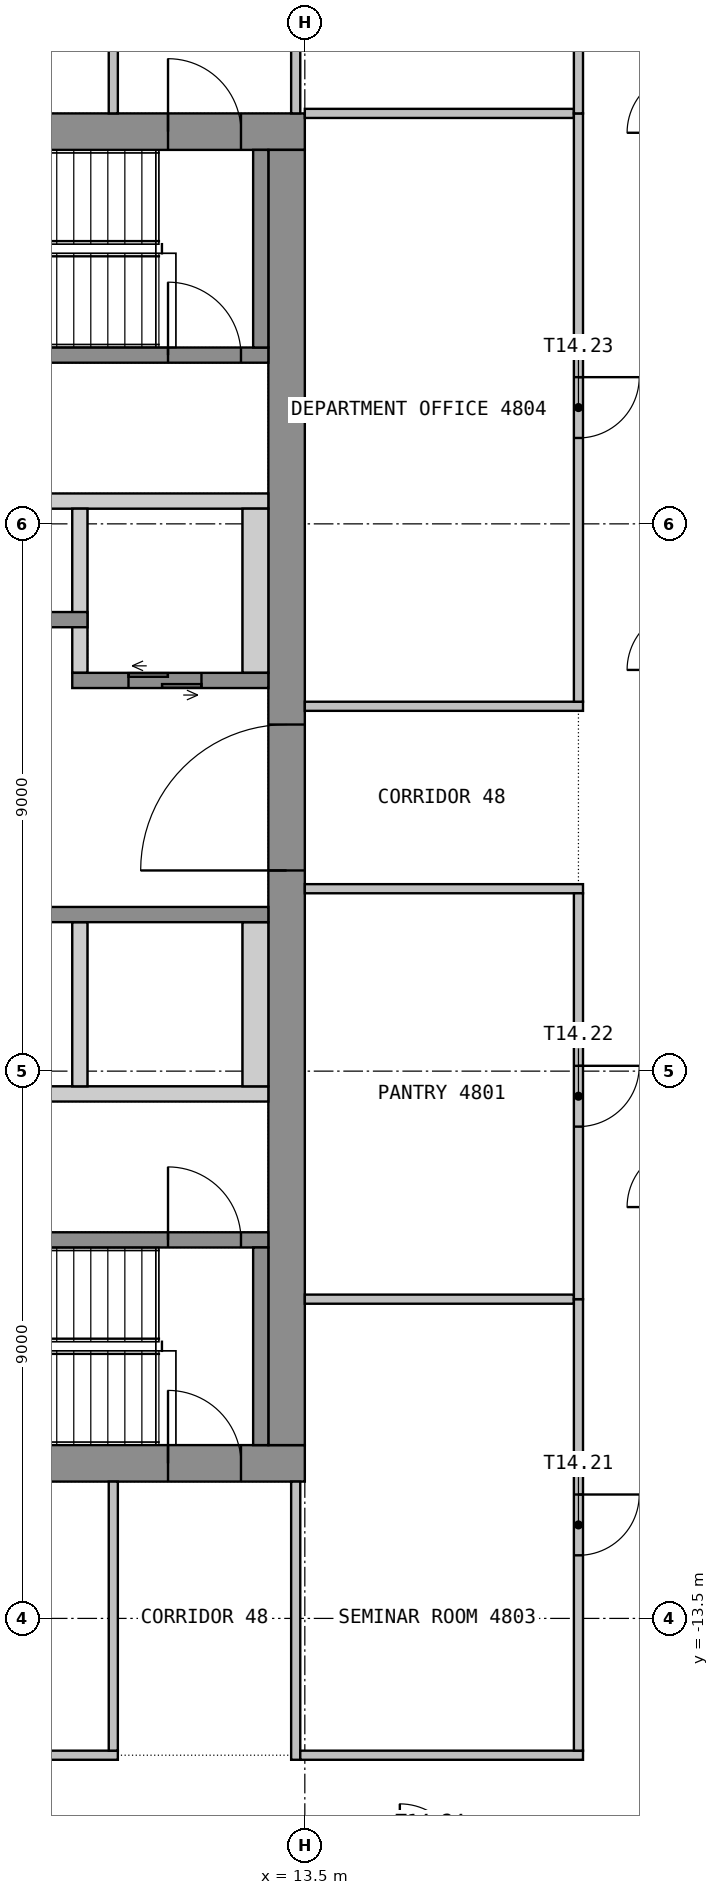
"""IFC4 building model, lengths in metres.
Left out: names, types, materials, properties, quantities, classifications, styles, units other than length and angle.
Written with IfcOpenShell. Run it as: python <this file> out.ifc"""

import sys

from ifc_helpers import new_model, si_unit, direction, frame, frame_2d, origin, place, context, subcontext, project, spatial, polyline, rectangle, outline, extrude, element, fill, save


model = new_model("IFC4")
c1 = context("Model", 3, precision=1e-05, world=origin(), true_north=direction((0.0, 1.0)))
c2 = subcontext(c1, "Body", "Model", "MODEL_VIEW")
j1 = project(units=[si_unit("LENGTHUNIT", "METRE"), si_unit("PLANEANGLEUNIT", "RADIAN")], contexts=[c1])
p1 = place(None, origin())
s1 = spatial("IfcSite", under=j1, at=p1, CompositionType="ELEMENT")
p2 = place(p1, origin())
s2 = spatial("IfcBuilding", under=s1, at=p2, CompositionType="ELEMENT")
p3 = place(p2, frame((0.0, 0.0, 195.6)))
s3 = spatial("IfcBuildingStorey", under=s2, at=p3, CompositionType="ELEMENT", Elevation=195.6)
p4 = place(p3, frame((-13.5, 10.95, 0.0), z_axis=(0.0, 0.0, 1.0), x_axis=(1.0, 0.0, 0.0)))
e1 = element("IfcWall", 1, at=p4, inside=s3, PredefinedType="SHEAR", context=c2, shape_type="SweptSolid", body=[
    extrude(rectangle(XDim=27.0, YDim=0.6, at=frame_2d((13.5, 0.0))), origin(), (0.0, 0.0, 1.0), 3.55),
])
p5 = place(p4, frame((12.3, 0.0, 0.0)))
e2 = element("IfcOpeningElement", 2, at=p5, cuts=e1, PredefinedType="OPENING", context=c2, shape_type="SweptSolid", body=[
    extrude(rectangle(XDim=2.4, YDim=2.1, at=frame_2d((1.2, 1.05))), frame((0.0, 0.31, 0.0), z_axis=(0.0, -1.0, 0.0), x_axis=(1.0, 0.0, 0.0)), (0.0, 0.0, 1.0), 0.62),
])
p6 = place(p4, frame((1.05, 0.0, 0.0)))
e3 = element("IfcOpeningElement", 3, at=p6, cuts=e1, PredefinedType="OPENING", context=c2, shape_type="SweptSolid", body=[
    extrude(rectangle(XDim=1.2, YDim=2.1, at=frame_2d((0.6, 1.05))), frame((0.0, 0.31, 0.0), z_axis=(0.0, -1.0, 0.0), x_axis=(1.0, 0.0, 0.0)), (0.0, 0.0, 1.0), 0.62),
])
p7 = place(p4, frame((24.75, 0.0, 0.0)))
e4 = element("IfcOpeningElement", 4, at=p7, cuts=e1, PredefinedType="OPENING", context=c2, shape_type="SweptSolid", body=[
    extrude(rectangle(XDim=1.2, YDim=2.1, at=frame_2d((0.6, 1.05))), frame((0.0, 0.31, 0.0), z_axis=(0.0, -1.0, 0.0), x_axis=(1.0, 0.0, 0.0)), (0.0, 0.0, 1.0), 0.62),
])
p8 = place(p3, frame((-13.5, -10.95, 0.0), z_axis=(0.0, 0.0, 1.0), x_axis=(1.0, 0.0, 0.0)))
e5 = element("IfcWall", 5, at=p8, inside=s3, PredefinedType="SHEAR", context=c2, shape_type="SweptSolid", body=[
    extrude(rectangle(XDim=27.0, YDim=0.6, at=frame_2d((13.5, 0.0))), origin(), (0.0, 0.0, 1.0), 3.55),
])
p9 = place(p8, frame((12.3, 0.0, 0.0)))
e6 = element("IfcOpeningElement", 6, at=p9, cuts=e5, PredefinedType="OPENING", context=c2, shape_type="SweptSolid", body=[
    extrude(rectangle(XDim=2.4, YDim=2.1, at=frame_2d((1.2, 1.05))), frame((0.0, 0.31, 0.0), z_axis=(0.0, -1.0, 0.0), x_axis=(1.0, 0.0, 0.0)), (0.0, 0.0, 1.0), 0.62),
])
p10 = place(p8, frame((1.05, 0.0, 0.0)))
e7 = element("IfcOpeningElement", 7, at=p10, cuts=e5, PredefinedType="OPENING", context=c2, shape_type="SweptSolid", body=[
    extrude(rectangle(XDim=1.2, YDim=2.1, at=frame_2d((0.6, 1.05))), frame((0.0, 0.31, 0.0), z_axis=(0.0, -1.0, 0.0), x_axis=(1.0, 0.0, 0.0)), (0.0, 0.0, 1.0), 0.62),
])
p11 = place(p8, frame((24.75, 0.0, 0.0)))
e8 = element("IfcOpeningElement", 8, at=p11, cuts=e5, PredefinedType="OPENING", context=c2, shape_type="SweptSolid", body=[
    extrude(rectangle(XDim=1.2, YDim=2.1, at=frame_2d((0.6, 1.05))), frame((0.0, 0.31, 0.0), z_axis=(0.0, -1.0, 0.0), x_axis=(1.0, 0.0, 0.0)), (0.0, 0.0, 1.0), 0.62),
])
p12 = place(p3, frame((13.2, -10.65, 0.0), z_axis=(0.0, 0.0, 1.0), x_axis=(0.0, 1.0, 0.0)))
e9 = element("IfcWall", 9, at=p12, inside=s3, PredefinedType="SHEAR", context=c2, shape_type="SweptSolid", body=[
    extrude(rectangle(XDim=21.3, YDim=0.6, at=frame_2d((10.65, 0.0))), origin(), (0.0, 0.0, 1.0), 3.55),
])
p13 = place(p12, frame((9.45, 0.0, 0.0)))
e10 = element("IfcOpeningElement", 10, at=p13, cuts=e9, PredefinedType="OPENING", context=c2, shape_type="SweptSolid", body=[
    extrude(rectangle(XDim=2.4, YDim=2.1, at=frame_2d((1.2, 1.05))), frame((0.0, 0.31, 0.0), z_axis=(0.0, -1.0, 0.0), x_axis=(1.0, 0.0, 0.0)), (0.0, 0.0, 1.0), 0.62),
])
p14 = place(p3, origin())
e11 = element("IfcWall", 11, at=p14, inside=s3, PredefinedType="SHEAR", context=c2, shape_type="SweptSolid", body=[
    extrude(outline(polyline([(4.075, 4.75), (12.9, 4.75), (12.9, 5.0), (4.075, 5.0), (4.075, 4.75)])), origin(), (0.0, 0.0, 1.0), 3.55),
])
p15 = place(p3, origin())
e12 = element("IfcWall", 12, at=p15, inside=s3, PredefinedType="SHEAR", context=c2, shape_type="SweptSolid", body=[
    extrude(outline(polyline([(9.675, 2.05), (9.925, 2.05), (9.925, 4.75), (9.675, 4.75), (9.675, 2.05)])), origin(), (0.0, 0.0, 1.0), 3.55),
])
p16 = place(p3, origin())
e13 = element("IfcWall", 13, at=p16, inside=s3, PredefinedType="SHEAR", context=c2, shape_type="SweptSolid", body=[
    extrude(outline(polyline([(12.475, 2.05), (12.9, 2.05), (12.9, 4.75), (12.475, 4.75), (12.475, 2.05)])), origin(), (0.0, 0.0, 1.0), 3.55),
])
p17 = place(p3, frame((4.075, 2.925, 0.0), z_axis=(0.0, 0.0, 1.0), x_axis=(1.0, 0.0, 0.0)))
e14 = element("IfcWall", 14, at=p17, inside=s3, PredefinedType="SHEAR", context=c2, shape_type="SweptSolid", body=[
    extrude(rectangle(XDim=5.85, YDim=0.25, at=frame_2d((2.925, 0.0))), origin(), (0.0, 0.0, 1.0), 3.55),
])
p18 = place(p17, frame((0.925, 0.0, 0.0)))
e15 = element("IfcOpeningElement", 15, at=p18, cuts=e14, PredefinedType="OPENING", context=c2, shape_type="SweptSolid", body=[
    extrude(rectangle(XDim=1.2, YDim=2.1, at=frame_2d((0.6, 1.05))), frame((0.0, 0.135, 0.0), z_axis=(0.0, -1.0, 0.0), x_axis=(1.0, 0.0, 0.0)), (0.0, 0.0, 1.0), 0.27),
])
p19 = place(p17, frame((3.725, 0.0, 0.0)))
e16 = element("IfcOpeningElement", 16, at=p19, cuts=e14, PredefinedType="OPENING", context=c2, shape_type="SweptSolid", body=[
    extrude(rectangle(XDim=1.2, YDim=2.1, at=frame_2d((0.6, 1.05))), frame((0.0, 0.135, 0.0), z_axis=(0.0, -1.0, 0.0), x_axis=(1.0, 0.0, 0.0)), (0.0, 0.0, 1.0), 0.27),
])
p20 = place(p3, frame((9.675, 1.925, 0.0), z_axis=(0.0, 0.0, 1.0), x_axis=(1.0, 0.0, 0.0)))
e17 = element("IfcWall", 17, at=p20, inside=s3, PredefinedType="SHEAR", context=c2, shape_type="SweptSolid", body=[
    extrude(rectangle(XDim=3.225, YDim=0.25, at=frame_2d((1.612, 0.0))), origin(), (0.0, 0.0, 1.0), 3.55),
])
p21 = place(p20, frame((0.925, 0.0, 0.0)))
e18 = element("IfcOpeningElement", 18, at=p21, cuts=e17, PredefinedType="OPENING", context=c2, shape_type="SweptSolid", body=[
    extrude(rectangle(XDim=1.2, YDim=2.1, at=frame_2d((0.6, 1.05))), frame((0.0, 0.135, 0.0), z_axis=(0.0, -1.0, 0.0), x_axis=(1.0, 0.0, 0.0)), (0.0, 0.0, 1.0), 0.27),
])
p22 = place(p3, origin())
e19 = element("IfcWall", 19, at=p22, inside=s3, PredefinedType="SHEAR", context=c2, shape_type="SweptSolid", body=[
    extrude(outline(polyline([(-1.525, -5.0), (12.9, -5.0), (12.9, -4.75), (-1.525, -4.75), (-1.525, -5.0)])), origin(), (0.0, 0.0, 1.0), 3.55),
])
p23 = place(p3, origin())
e20 = element("IfcWall", 20, at=p23, inside=s3, PredefinedType="SHEAR", context=c2, shape_type="SweptSolid", body=[
    extrude(outline(polyline([(9.675, -4.75), (9.925, -4.75), (9.925, -2.05), (9.675, -2.05), (9.675, -4.75)])), origin(), (0.0, 0.0, 1.0), 3.55),
])
p24 = place(p3, origin())
e21 = element("IfcWall", 21, at=p24, inside=s3, PredefinedType="SHEAR", context=c2, shape_type="SweptSolid", body=[
    extrude(outline(polyline([(12.475, -4.75), (12.9, -4.75), (12.9, -2.05), (12.475, -2.05), (12.475, -4.75)])), origin(), (0.0, 0.0, 1.0), 3.55),
])
p25 = place(p3, frame((-1.525, -1.925, 0.0), z_axis=(0.0, 0.0, 1.0), x_axis=(1.0, 0.0, 0.0)))
e22 = element("IfcWall", 22, at=p25, inside=s3, PredefinedType="SHEAR", context=c2, shape_type="SweptSolid", body=[
    extrude(rectangle(XDim=14.425, YDim=0.25, at=frame_2d((7.212, 0.0))), origin(), (0.0, 0.0, 1.0), 3.55),
])
p26 = place(p25, frame((0.925, 0.0, 0.0)))
e23 = element("IfcOpeningElement", 23, at=p26, cuts=e22, PredefinedType="OPENING", context=c2, shape_type="SweptSolid", body=[
    extrude(rectangle(XDim=1.2, YDim=2.1, at=frame_2d((0.6, 1.05))), frame((0.0, 0.135, 0.0), z_axis=(0.0, -1.0, 0.0), x_axis=(1.0, 0.0, 0.0)), (0.0, 0.0, 1.0), 0.27),
])
p27 = place(p25, frame((3.725, 0.0, 0.0)))
e24 = element("IfcOpeningElement", 24, at=p27, cuts=e22, PredefinedType="OPENING", context=c2, shape_type="SweptSolid", body=[
    extrude(rectangle(XDim=1.2, YDim=2.1, at=frame_2d((0.6, 1.05))), frame((0.0, 0.135, 0.0), z_axis=(0.0, -1.0, 0.0), x_axis=(1.0, 0.0, 0.0)), (0.0, 0.0, 1.0), 0.27),
])
p28 = place(p3, frame((2.8, 7.275, 0.0), z_axis=(0.0, 0.0, 1.0), x_axis=(1.0, 0.0, 0.0)))
e25 = element("IfcWall", 25, at=p28, inside=s3, PredefinedType="SHEAR", context=c2, shape_type="SweptSolid", body=[
    extrude(rectangle(XDim=10.1, YDim=0.25, at=frame_2d((5.05, 0.0))), origin(), (0.0, 0.0, 1.0), 3.55),
])
p29 = place(p28, frame((8.45, 0.0, 0.0)))
e26 = element("IfcOpeningElement", 26, at=p29, cuts=e25, PredefinedType="OPENING", context=c2, shape_type="SweptSolid", body=[
    extrude(rectangle(XDim=1.2, YDim=2.1, at=frame_2d((0.6, 1.05))), frame((0.0, 0.135, 0.0), z_axis=(0.0, -1.0, 0.0), x_axis=(1.0, 0.0, 0.0)), (0.0, 0.0, 1.0), 0.27),
])
p30 = place(p3, frame((12.775, 7.4, 0.0), z_axis=(0.0, 0.0, 1.0), x_axis=(0.0, 1.0, 0.0)))
e27 = element("IfcWall", 27, at=p30, inside=s3, PredefinedType="SHEAR", context=c2, shape_type="SweptSolid", body=[
    extrude(rectangle(XDim=3.25, YDim=0.25, at=frame_2d((1.625, 0.0))), origin(), (0.0, 0.0, 1.0), 3.55),
])
p31 = place(p3, frame((2.8, -7.275, 0.0), z_axis=(0.0, 0.0, 1.0), x_axis=(1.0, 0.0, 0.0)))
e28 = element("IfcWall", 28, at=p31, inside=s3, PredefinedType="SHEAR", context=c2, shape_type="SweptSolid", body=[
    extrude(rectangle(XDim=10.1, YDim=0.25, at=frame_2d((5.05, 0.0))), origin(), (0.0, 0.0, 1.0), 3.55),
])
p32 = place(p31, frame((8.45, 0.0, 0.0)))
e29 = element("IfcOpeningElement", 29, at=p32, cuts=e28, PredefinedType="OPENING", context=c2, shape_type="SweptSolid", body=[
    extrude(rectangle(XDim=1.2, YDim=2.1, at=frame_2d((0.6, 1.05))), frame((0.0, 0.135, 0.0), z_axis=(0.0, -1.0, 0.0), x_axis=(1.0, 0.0, 0.0)), (0.0, 0.0, 1.0), 0.27),
])
p33 = place(p3, frame((12.775, -10.65, 0.0), z_axis=(0.0, 0.0, 1.0), x_axis=(0.0, 1.0, 0.0)))
e30 = element("IfcWall", 30, at=p33, inside=s3, PredefinedType="SHEAR", context=c2, shape_type="SweptSolid", body=[
    extrude(rectangle(XDim=3.25, YDim=0.25, at=frame_2d((1.625, 0.0))), origin(), (0.0, 0.0, 1.0), 3.55),
])
p34 = place(p3, frame((10.425, -15.75, 0.0), z_axis=(0.0, 0.0, 1.0), x_axis=(-1.0, 0.0, 0.0)))
e31 = element("IfcWall", 31, at=p34, inside=s3, PredefinedType="PARTITIONING", context=c2, shape_type="SweptSolid", body=[
    extrude(rectangle(XDim=8.85, YDim=0.15, at=frame_2d((4.425, 0.0))), origin(), (0.0, 0.0, 1.0), 3.55),
])
p35 = place(p34, frame((3.925, 0.0, 0.0)))
e32 = element("IfcOpeningElement", 32, at=p35, cuts=e31, PredefinedType="OPENING", context=c2, shape_type="SweptSolid", body=[
    extrude(rectangle(XDim=1.0, YDim=2.1, at=frame_2d((0.5, 1.05))), frame((0.0, 0.085, 0.0), z_axis=(0.0, -1.0, 0.0), x_axis=(1.0, 0.0, 0.0)), (0.0, 0.0, 1.0), 0.17),
])
for number, where, z_axis, x_axis in (
    (33, (10.35, -11.25, 0.0), (0.0, 0.0, 1.0), (0.0, -1.0, 0.0)),
    (34, (10.35, 15.675, 0.0), (0.0, 0.0, 1.0), (0.0, -1.0, 0.0)),
):
    element("IfcWall", number, at=place(p3, frame(where, z_axis=z_axis, x_axis=x_axis)), inside=s3, PredefinedType="PARTITIONING", context=c2, shape_type="SweptSolid", body=[
        extrude(rectangle(XDim=4.425, YDim=0.15, at=frame_2d((2.212, 0.0))), origin(), (0.0, 0.0, 1.0), 3.55),
    ])
p36 = place(p3, frame((13.35, -15.825, 0.0), z_axis=(0.0, 0.0, 1.0), x_axis=(0.0, 1.0, 0.0)))
e35 = element("IfcWall", 35, at=p36, inside=s3, PredefinedType="PARTITIONING", context=c2, shape_type="SweptSolid", body=[
    extrude(rectangle(XDim=4.575, YDim=0.15, at=frame_2d((2.288, 0.0))), origin(), (0.0, 0.0, 1.0), 3.55),
])
p37 = place(p3, frame((18.075, -15.75, 0.0), z_axis=(0.0, 0.0, 1.0), x_axis=(-1.0, 0.0, 0.0)))
e36 = element("IfcWall", 36, at=p37, inside=s3, PredefinedType="PARTITIONING", context=c2, shape_type="SweptSolid", body=[
    extrude(rectangle(XDim=4.65, YDim=0.15, at=frame_2d((2.325, 0.0))), origin(), (0.0, 0.0, 1.0), 3.55),
])
p38 = place(p3, frame((13.35, 11.25, 0.0), z_axis=(0.0, 0.0, 1.0), x_axis=(0.0, 1.0, 0.0)))
e37 = element("IfcWall", 37, at=p38, inside=s3, PredefinedType="PARTITIONING", context=c2, shape_type="SweptSolid", body=[
    extrude(rectangle(XDim=4.575, YDim=0.15, at=frame_2d((2.288, 0.0))), origin(), (0.0, 0.0, 1.0), 3.55),
])
p39 = place(p3, frame((13.5, -8.25, 0.0), z_axis=(0.0, 0.0, 1.0), x_axis=(1.0, 0.0, 0.0)))
e38 = element("IfcWall", 38, at=p39, inside=s3, PredefinedType="PARTITIONING", context=c2, shape_type="SweptSolid", body=[
    extrude(rectangle(XDim=4.425, YDim=0.15, at=frame_2d((2.212, 0.0))), origin(), (0.0, 0.0, 1.0), 3.55),
])
for number, where, z_axis, x_axis in (
    (39, (13.5, -1.5, 0.0), (0.0, 0.0, 1.0), (1.0, 0.0, 0.0)),
    (40, (18.075, 1.5, 0.0), (0.0, 0.0, 1.0), (-1.0, 0.0, 0.0)),
):
    element("IfcWall", number, at=place(p3, frame(where, z_axis=z_axis, x_axis=x_axis)), inside=s3, PredefinedType="PARTITIONING", context=c2, shape_type="SweptSolid", body=[
        extrude(rectangle(XDim=4.575, YDim=0.15, at=frame_2d((2.288, 0.0))), origin(), (0.0, 0.0, 1.0), 3.55),
    ])
p40 = place(p3, frame((17.925, 11.25, 0.0), z_axis=(0.0, 0.0, 1.0), x_axis=(-1.0, 0.0, 0.0)))
e41 = element("IfcWall", 41, at=p40, inside=s3, PredefinedType="PARTITIONING", context=c2, shape_type="SweptSolid", body=[
    extrude(rectangle(XDim=4.425, YDim=0.15, at=frame_2d((2.212, 0.0))), origin(), (0.0, 0.0, 1.0), 3.55),
])
p41 = place(p3, frame((18.0, -8.25, 0.0), z_axis=(0.0, 0.0, 1.0), x_axis=(0.0, -1.0, 0.0)))
e42 = element("IfcWall", 42, at=p41, inside=s3, PredefinedType="PARTITIONING", context=c2, shape_type="SweptSolid", body=[
    extrude(rectangle(XDim=7.425, YDim=0.15, at=frame_2d((3.712, 0.0))), origin(), (0.0, 0.0, 1.0), 3.55),
])
p42 = place(p41, frame((3.212, 0.0, 0.0)))
e43 = element("IfcOpeningElement", 43, at=p42, cuts=e42, PredefinedType="OPENING", context=c2, shape_type="SweptSolid", body=[
    extrude(rectangle(XDim=1.0, YDim=2.1, at=frame_2d((0.5, 1.05))), frame((0.0, 0.085, 0.0), z_axis=(0.0, -1.0, 0.0), x_axis=(1.0, 0.0, 0.0)), (0.0, 0.0, 1.0), 0.17),
])
p43 = place(p3, frame((18.0, -1.575, 0.0), z_axis=(0.0, 0.0, 1.0), x_axis=(0.0, -1.0, 0.0)))
e44 = element("IfcWall", 44, at=p43, inside=s3, PredefinedType="PARTITIONING", context=c2, shape_type="SweptSolid", body=[
    extrude(rectangle(XDim=6.675, YDim=0.15, at=frame_2d((3.337, 0.0))), origin(), (0.0, 0.0, 1.0), 3.55),
])
p44 = place(p43, frame((2.837, 0.0, 0.0)))
e45 = element("IfcOpeningElement", 45, at=p44, cuts=e44, PredefinedType="OPENING", context=c2, shape_type="SweptSolid", body=[
    extrude(rectangle(XDim=1.0, YDim=2.1, at=frame_2d((0.5, 1.05))), frame((0.0, 0.085, 0.0), z_axis=(0.0, -1.0, 0.0), x_axis=(1.0, 0.0, 0.0)), (0.0, 0.0, 1.0), 0.17),
])
p45 = place(p3, frame((18.0, 11.25, 0.0), z_axis=(0.0, 0.0, 1.0), x_axis=(0.0, -1.0, 0.0)))
e46 = element("IfcWall", 46, at=p45, inside=s3, PredefinedType="PARTITIONING", context=c2, shape_type="SweptSolid", body=[
    extrude(rectangle(XDim=9.675, YDim=0.15, at=frame_2d((4.837, 0.0))), origin(), (0.0, 0.0, 1.0), 3.55),
])
p46 = place(p45, frame((4.337, 0.0, 0.0)))
e47 = element("IfcOpeningElement", 47, at=p46, cuts=e46, PredefinedType="OPENING", context=c2, shape_type="SweptSolid", body=[
    extrude(rectangle(XDim=1.0, YDim=2.1, at=frame_2d((0.5, 1.05))), frame((0.0, 0.085, 0.0), z_axis=(0.0, -1.0, 0.0), x_axis=(1.0, 0.0, 0.0)), (0.0, 0.0, 1.0), 0.17),
])
p47 = place(p3, frame((18.0, 15.675, 0.0), z_axis=(0.0, 0.0, 1.0), x_axis=(0.0, -1.0, 0.0)))
e48 = element("IfcWall", 48, at=p47, inside=s3, PredefinedType="PARTITIONING", context=c2, shape_type="SweptSolid", body=[
    extrude(rectangle(XDim=4.425, YDim=0.15, at=frame_2d((2.212, 0.0))), origin(), (0.0, 0.0, 1.0), 3.55),
])
p48 = place(p13, origin())
e49 = element("IfcDoor", 49, at=p48, inside=s3, OperationType="DOUBLE_DOOR_DOUBLE_SWING", PredefinedType="DOOR", context=c2, shape_type="SweptSolid", body=[
    extrude(rectangle(XDim=2.4, YDim=2.1, at=frame_2d((1.2, 1.05))), frame((0.0, 0.025, 0.0), z_axis=(0.0, -1.0, 0.0), x_axis=(1.0, 0.0, 0.0)), (0.0, 0.0, 1.0), 0.05),
])
fill(e10, e49)
p49 = place(p7, origin())
e50 = element("IfcDoor", 50, at=p49, inside=s3, OperationType="SINGLE_SWING_RIGHT", PredefinedType="DOOR", context=c2, shape_type="SweptSolid", body=[
    extrude(rectangle(XDim=1.2, YDim=2.1, at=frame_2d((0.6, 1.05))), frame((0.0, 0.025, 0.0), z_axis=(0.0, -1.0, 0.0), x_axis=(1.0, 0.0, 0.0)), (0.0, 0.0, 1.0), 0.05),
])
fill(e4, e50)
p50 = place(p11, origin())
e51 = element("IfcDoor", 51, at=p50, inside=s3, OperationType="SINGLE_SWING_RIGHT", PredefinedType="DOOR", context=c2, shape_type="SweptSolid", body=[
    extrude(rectangle(XDim=1.2, YDim=2.1, at=frame_2d((0.6, 1.05))), frame((0.0, 0.025, 0.0), z_axis=(0.0, -1.0, 0.0), x_axis=(1.0, 0.0, 0.0)), (0.0, 0.0, 1.0), 0.05),
])
fill(e8, e51)
p51 = place(p21, origin())
e52 = element("IfcDoor", 52, at=p51, inside=s3, OperationType="DOUBLE_DOOR_SLIDING", PredefinedType="DOOR", context=c2, shape_type="SweptSolid", body=[
    extrude(rectangle(XDim=1.2, YDim=2.1, at=frame_2d((0.6, 1.05))), frame((0.0, 0.025, 0.0), z_axis=(0.0, -1.0, 0.0), x_axis=(1.0, 0.0, 0.0)), (0.0, 0.0, 1.0), 0.05),
])
fill(e18, e52)
p52 = place(p29, origin())
e53 = element("IfcDoor", 53, at=p52, inside=s3, OperationType="SINGLE_SWING_LEFT", PredefinedType="DOOR", context=c2, shape_type="SweptSolid", body=[
    extrude(rectangle(XDim=1.2, YDim=2.1, at=frame_2d((0.6, 1.05))), frame((0.0, 0.025, 0.0), z_axis=(0.0, -1.0, 0.0), x_axis=(1.0, 0.0, 0.0)), (0.0, 0.0, 1.0), 0.05),
])
fill(e26, e53)
p53 = place(p32, origin())
e54 = element("IfcDoor", 54, at=p53, inside=s3, OperationType="SINGLE_SWING_LEFT", PredefinedType="DOOR", context=c2, shape_type="SweptSolid", body=[
    extrude(rectangle(XDim=1.2, YDim=2.1, at=frame_2d((0.6, 1.05))), frame((0.0, 0.025, 0.0), z_axis=(0.0, -1.0, 0.0), x_axis=(1.0, 0.0, 0.0)), (0.0, 0.0, 1.0), 0.05),
])
fill(e29, e54)
p54 = place(p42, origin())
e55 = element("IfcDoor", 55, at=p54, inside=s3, OperationType="SINGLE_SWING_RIGHT", PredefinedType="DOOR", context=c2, shape_type="SweptSolid", body=[
    extrude(rectangle(XDim=1.0, YDim=2.1, at=frame_2d((0.5, 1.05))), frame((0.0, 0.025, 0.0), z_axis=(0.0, -1.0, 0.0), x_axis=(1.0, 0.0, 0.0)), (0.0, 0.0, 1.0), 0.05),
])
fill(e43, e55)
p55 = place(p44, origin())
e56 = element("IfcDoor", 56, at=p55, inside=s3, OperationType="SINGLE_SWING_RIGHT", PredefinedType="DOOR", context=c2, shape_type="SweptSolid", body=[
    extrude(rectangle(XDim=1.0, YDim=2.1, at=frame_2d((0.5, 1.05))), frame((0.0, 0.025, 0.0), z_axis=(0.0, -1.0, 0.0), x_axis=(1.0, 0.0, 0.0)), (0.0, 0.0, 1.0), 0.05),
])
fill(e45, e56)
p56 = place(p46, origin())
e57 = element("IfcDoor", 57, at=p56, inside=s3, OperationType="SINGLE_SWING_LEFT", PredefinedType="DOOR", context=c2, shape_type="SweptSolid", body=[
    extrude(rectangle(XDim=1.0, YDim=2.1, at=frame_2d((0.5, 1.05))), frame((0.0, 0.025, 0.0), z_axis=(0.0, -1.0, 0.0), x_axis=(1.0, 0.0, 0.0)), (0.0, 0.0, 1.0), 0.05),
])
fill(e47, e57)
save(model, sys.argv[1])
